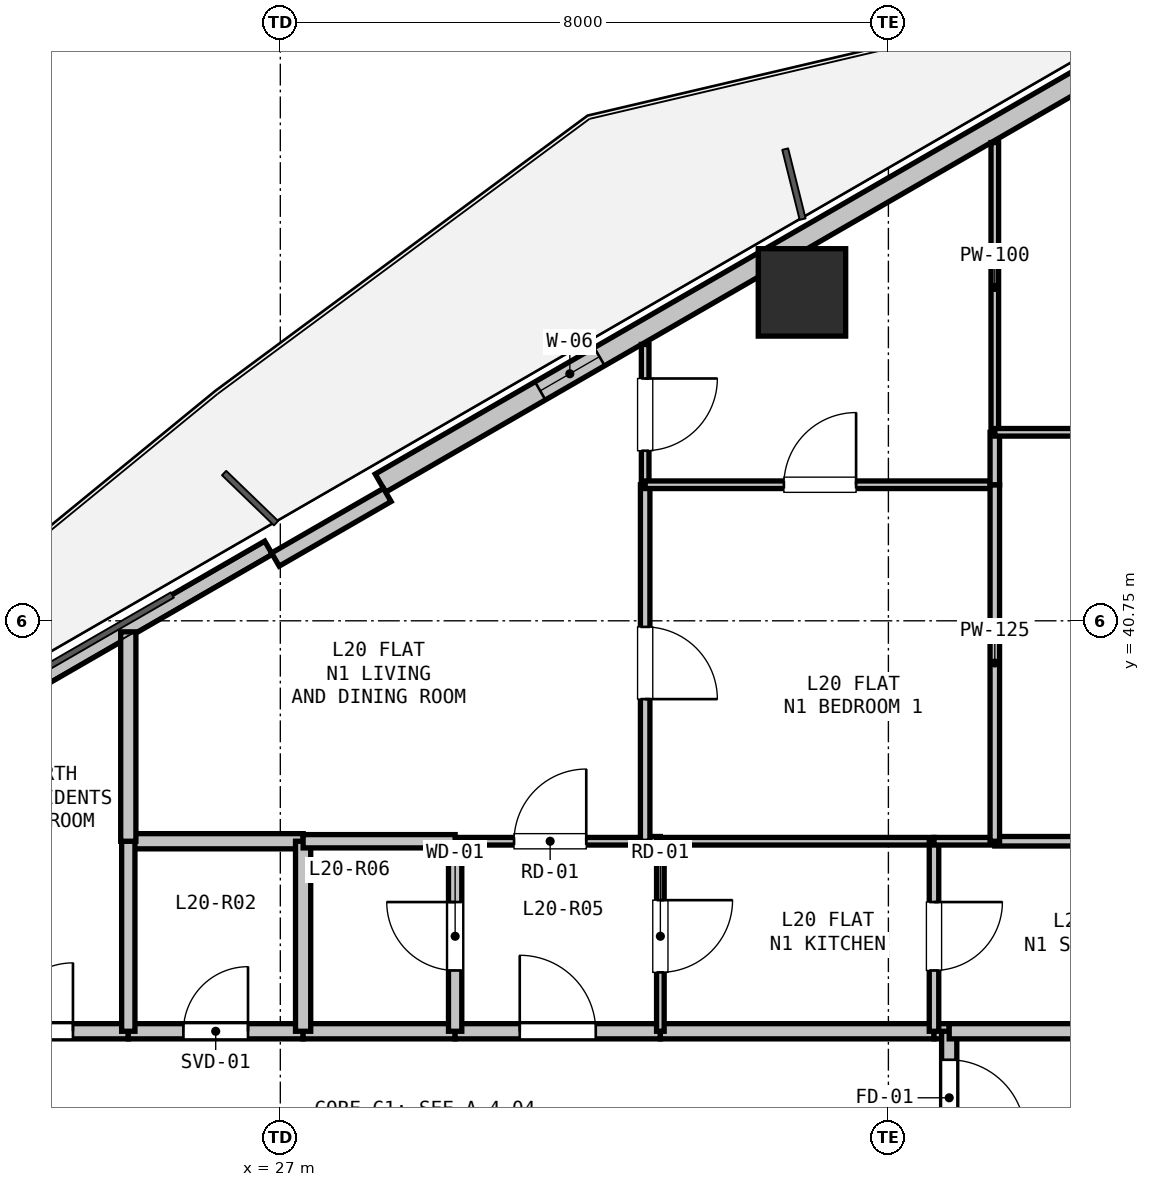
"""IFC4 building model, lengths in metres.
Left out: names, types, materials, properties, quantities, classifications, styles, units other than length and angle.
Written with IfcOpenShell. Run it as: python <this file> out.ifc"""

import sys

from ifc_helpers import new_model, si_unit, direction, frame, frame_2d, origin, origin_2d, place, context, subcontext, project, spatial, rectangle, hollow_rectangle, extrude, element, fill, save


model = new_model("IFC4")
c1 = context("Model", 3, precision=1e-05, world=origin(), true_north=direction((0.0, 1.0)))
c2 = subcontext(c1, "Body", "Model", "MODEL_VIEW")
j1 = project(units=[si_unit("LENGTHUNIT", "METRE"), si_unit("PLANEANGLEUNIT", "RADIAN")], contexts=[c1])
p1 = place(None, origin())
s1 = spatial("IfcSite", under=j1, at=p1, CompositionType="ELEMENT")
p2 = place(p1, origin())
s2 = spatial("IfcBuilding", under=s1, at=p2, CompositionType="ELEMENT")
p3 = place(p2, frame((0.0, 0.0, 76.8)))
s3 = spatial("IfcBuildingStorey", under=s2, at=p3, CompositionType="ELEMENT", Elevation=76.8)
p4 = place(p3, frame((33.863, 45.071, 0.0), z_axis=(0.0, 0.0, 1.0), x_axis=(1.0, 0.0, 0.0)))
e1 = element("IfcColumn", 1, at=p4, inside=s3, PredefinedType="COLUMN", context=c2, shape_type="SweptSolid", body=[
    extrude(hollow_rectangle(XDim=1.15, YDim=1.15, WallThickness=0.032, at=origin_2d()), origin(), (0.0, 0.0, 1.0), 3.3),
])
p5 = place(p3, frame((17.12, 36.097, 0.0), z_axis=(0.0, 0.0, 1.0), x_axis=(0.866027010039, 0.499997217876, 0.0)))
e2 = element("IfcWall", 2, at=p5, inside=s3, PredefinedType="PARAPET", context=c2, shape_type="SweptSolid", body=[
    extrude(rectangle(XDim=11.229, YDim=0.2, at=frame_2d((5.615, 0.0))), origin(), (0.0, 0.0, 1.0), 0.2),
])
p6 = place(p3, frame((28.317, 42.562, 0.0), z_axis=(0.0, 0.0, 1.0), x_axis=(0.866023023012, 0.500004123596, 0.0)))
e3 = element("IfcWall", 3, at=p6, inside=s3, PredefinedType="SOLIDWALL", context=c2, shape_type="SweptSolid", body=[
    extrude(rectangle(XDim=11.93, YDim=0.275, at=frame_2d((5.965, 0.0))), origin(), (0.0, 0.0, 1.0), 2.67),
])
p7 = place(p6, frame((2.427, 0.0, 0.9)))
e4 = element("IfcOpeningElement", 4, at=p7, cuts=e3, PredefinedType="OPENING", context=c2, shape_type="SweptSolid", body=[
    extrude(rectangle(XDim=0.9, YDim=1.4, at=frame_2d((0.45, 0.7))), frame((0.0, 0.147, 0.0), z_axis=(0.0, -1.0, 0.0), x_axis=(1.0, 0.0, 0.0)), (0.0, 0.0, 1.0), 0.295),
])
p8 = place(p3, frame((26.935, 41.556, 0.0), z_axis=(0.0, 0.0, 1.0), x_axis=(0.86605165483, 0.499954529098, 0.0)))
e5 = element("IfcWall", 5, at=p8, inside=s3, PredefinedType="PARAPET", context=c2, shape_type="SweptSolid", body=[
    extrude(rectangle(XDim=1.7, YDim=0.2, at=frame_2d((0.85, 0.0))), origin(), (0.0, 0.0, 1.0), 2.67),
])
p9 = place(p3, frame((19.8, 35.35, 0.0), z_axis=(0.0, 0.0, 1.0), x_axis=(1.0, 0.0, 0.0)))
e6 = element("IfcWall", 6, at=p9, inside=s3, PredefinedType="PARTITIONING", context=c2, shape_type="SweptSolid", body=[
    extrude(rectangle(XDim=5.2, YDim=0.2, at=frame_2d((2.6, 0.0))), origin(), (0.0, 0.0, 1.0), 3.05),
])
p10 = place(p9, frame((2.672, 0.0, 0.0)))
e7 = element("IfcOpeningElement", 7, at=p10, cuts=e6, PredefinedType="OPENING", context=c2, shape_type="SweptSolid", body=[
    extrude(rectangle(XDim=1.8, YDim=2.2, at=frame_2d((0.9, 1.1))), frame((0.0, 0.11, 0.0), z_axis=(0.0, -1.0, 0.0), x_axis=(1.0, 0.0, 0.0)), (0.0, 0.0, 1.0), 0.22),
])
p11 = place(p3, frame((25.0, 35.35, 0.0), z_axis=(0.0, 0.0, 1.0), x_axis=(1.0, 0.0, 0.0)))
e8 = element("IfcWall", 8, at=p11, inside=s3, PredefinedType="PARTITIONING", context=c2, shape_type="SweptSolid", body=[
    extrude(rectangle(XDim=2.3, YDim=0.2, at=frame_2d((1.15, 0.0))), origin(), (0.0, 0.0, 1.0), 3.05),
])
p12 = place(p11, frame((0.725, 0.0, 0.0)))
e9 = element("IfcOpeningElement", 9, at=p12, cuts=e8, PredefinedType="OPENING", context=c2, shape_type="SweptSolid", body=[
    extrude(rectangle(XDim=0.85, YDim=2.1, at=frame_2d((0.425, 1.05))), frame((0.0, 0.11, 0.0), z_axis=(0.0, -1.0, 0.0), x_axis=(1.0, 0.0, 0.0)), (0.0, 0.0, 1.0), 0.22),
])
p13 = place(p3, frame((27.3, 35.35, 0.0), z_axis=(0.0, 0.0, 1.0), x_axis=(1.0, 0.0, 0.0)))
e10 = element("IfcWall", 10, at=p13, inside=s3, PredefinedType="PARTITIONING", context=c2, shape_type="SweptSolid", body=[
    extrude(rectangle(XDim=2.0, YDim=0.2, at=frame_2d((1.0, 0.0))), origin(), (0.0, 0.0, 1.0), 3.05),
])
p14 = place(p3, frame((29.3, 35.35, 0.0), z_axis=(0.0, 0.0, 1.0), x_axis=(1.0, 0.0, 0.0)))
e11 = element("IfcWall", 11, at=p14, inside=s3, PredefinedType="PARTITIONING", context=c2, shape_type="SweptSolid", body=[
    extrude(rectangle(XDim=2.7, YDim=0.2, at=frame_2d((1.35, 0.0))), origin(), (0.0, 0.0, 1.0), 3.05),
])
p15 = place(p14, frame((0.85, 0.0, 0.0)))
e12 = element("IfcOpeningElement", 12, at=p15, cuts=e11, PredefinedType="OPENING", context=c2, shape_type="SweptSolid", body=[
    extrude(rectangle(XDim=1.0, YDim=2.15, at=frame_2d((0.5, 1.075))), frame((0.0, 0.11, 0.0), z_axis=(0.0, -1.0, 0.0), x_axis=(1.0, 0.0, 0.0)), (0.0, 0.0, 1.0), 0.22),
])
p16 = place(p3, frame((32.0, 35.35, 0.0), z_axis=(0.0, 0.0, 1.0), x_axis=(1.0, 0.0, 0.0)))
e13 = element("IfcWall", 13, at=p16, inside=s3, PredefinedType="PARTITIONING", context=c2, shape_type="SweptSolid", body=[
    extrude(rectangle(XDim=3.6, YDim=0.2, at=frame_2d((1.8, 0.0))), origin(), (0.0, 0.0, 1.0), 3.05),
])
p17 = place(p3, frame((35.6, 35.35, 0.0), z_axis=(0.0, 0.0, 1.0), x_axis=(1.0, 0.0, 0.0)))
e14 = element("IfcWall", 14, at=p17, inside=s3, PredefinedType="PARTITIONING", context=c2, shape_type="SweptSolid", body=[
    extrude(rectangle(XDim=0.2, YDim=0.2, at=frame_2d((0.1, 0.0))), origin(), (0.0, 0.0, 1.0), 3.05),
])
p18 = place(p3, frame((35.8, 35.35, 0.0), z_axis=(0.0, 0.0, 1.0), x_axis=(0.0, -1.0, 0.0)))
e15 = element("IfcWall", 15, at=p18, inside=s3, PredefinedType="PARTITIONING", context=c2, shape_type="SweptSolid", body=[
    extrude(rectangle(XDim=1.75, YDim=0.2, at=frame_2d((0.875, 0.0))), origin(), (0.0, 0.0, 1.0), 3.05),
])
p19 = place(p18, frame((0.375, 0.0, 0.0)))
e16 = element("IfcOpeningElement", 16, at=p19, cuts=e15, PredefinedType="OPENING", context=c2, shape_type="SweptSolid", body=[
    extrude(rectangle(XDim=1.0, YDim=2.15, at=frame_2d((0.5, 1.075))), frame((0.0, 0.11, 0.0), z_axis=(0.0, -1.0, 0.0), x_axis=(1.0, 0.0, 0.0)), (0.0, 0.0, 1.0), 0.22),
])
p20 = place(p3, frame((35.8, 35.35, 0.0), z_axis=(0.0, 0.0, 1.0), x_axis=(1.0, 0.0, 0.0)))
e17 = element("IfcWall", 17, at=p20, inside=s3, PredefinedType="PARTITIONING", context=c2, shape_type="SweptSolid", body=[
    extrude(rectangle(XDim=2.6, YDim=0.2, at=frame_2d((1.3, 0.0))), origin(), (0.0, 0.0, 1.0), 2.423),
])
p21 = place(p3, frame((29.3, 37.85, 0.0), z_axis=(0.0, 0.0, 1.0), x_axis=(1.0, 0.0, 0.0)))
e18 = element("IfcWall", 18, at=p21, inside=s3, PredefinedType="PARTITIONING", context=c2, shape_type="SweptSolid", body=[
    extrude(rectangle(XDim=2.5, YDim=0.1, at=frame_2d((1.25, 0.0))), origin(), (0.0, 0.0, 1.0), 3.05),
])
p22 = place(p21, frame((0.775, 0.0, 0.0)))
e19 = element("IfcOpeningElement", 19, at=p22, cuts=e18, PredefinedType="OPENING", context=c2, shape_type="SweptSolid", body=[
    extrude(rectangle(XDim=0.95, YDim=2.1, at=frame_2d((0.475, 1.05))), frame((0.0, 0.06, 0.0), z_axis=(0.0, -1.0, 0.0), x_axis=(1.0, 0.0, 0.0)), (0.0, 0.0, 1.0), 0.12),
])
p23 = place(p3, frame((31.8, 37.85, 0.0), z_axis=(0.0, 0.0, 1.0), x_axis=(1.0, 0.0, 0.0)))
e20 = element("IfcWall", 20, at=p23, inside=s3, PredefinedType="PARTITIONING", context=c2, shape_type="SweptSolid", body=[
    extrude(rectangle(XDim=0.2, YDim=0.125, at=frame_2d((0.1, 0.0))), origin(), (0.0, 0.0, 1.0), 3.05),
])
p24 = place(p3, frame((32.0, 37.85, 0.0), z_axis=(0.0, 0.0, 1.0), x_axis=(0.0, -1.0, 0.0)))
e21 = element("IfcWall", 21, at=p24, inside=s3, PredefinedType="PARTITIONING", context=c2, shape_type="SweptSolid", body=[
    extrude(rectangle(XDim=2.5, YDim=0.1, at=frame_2d((1.25, 0.0))), origin(), (0.0, 0.0, 1.0), 3.05),
])
p25 = place(p24, frame((0.775, 0.0, 0.0)))
e22 = element("IfcOpeningElement", 22, at=p25, cuts=e21, PredefinedType="OPENING", context=c2, shape_type="SweptSolid", body=[
    extrude(rectangle(XDim=0.95, YDim=2.1, at=frame_2d((0.475, 1.05))), frame((0.0, 0.06, 0.0), z_axis=(0.0, -1.0, 0.0), x_axis=(1.0, 0.0, 0.0)), (0.0, 0.0, 1.0), 0.12),
])
p26 = place(p3, frame((29.3, 35.35, 0.0), z_axis=(0.0, 0.0, 1.0), x_axis=(0.0, 1.0, 0.0)))
e23 = element("IfcWall", 23, at=p26, inside=s3, PredefinedType="PLUMBINGWALL", context=c2, shape_type="SweptSolid", body=[
    extrude(rectangle(XDim=2.5, YDim=0.175, at=frame_2d((1.25, 0.0))), origin(), (0.0, 0.0, 1.0), 3.05),
])
p27 = place(p26, frame((0.8, 0.0, 0.0)))
e24 = element("IfcOpeningElement", 24, at=p27, cuts=e23, PredefinedType="OPENING", context=c2, shape_type="SweptSolid", body=[
    extrude(rectangle(XDim=0.9, YDim=2.1, at=frame_2d((0.45, 1.05))), frame((0.0, 0.097, 0.0), z_axis=(0.0, -1.0, 0.0), x_axis=(1.0, 0.0, 0.0)), (0.0, 0.0, 1.0), 0.195),
])
p28 = place(p3, frame((25.0, 37.85, 0.0), z_axis=(0.0, 0.0, 1.0), x_axis=(1.0, 0.0, 0.0)))
e25 = element("IfcWall", 25, at=p28, inside=s3, PredefinedType="PARTITIONING", context=c2, shape_type="SweptSolid", body=[
    extrude(rectangle(XDim=2.3, YDim=0.2, at=frame_2d((1.15, 0.0))), origin(), (0.0, 0.0, 1.0), 3.05),
])
p29 = place(p3, frame((27.3, 37.85, 0.0), z_axis=(0.0, 0.0, 1.0), x_axis=(0.0, -1.0, 0.0)))
e26 = element("IfcWall", 26, at=p29, inside=s3, PredefinedType="PARTITIONING", context=c2, shape_type="SweptSolid", body=[
    extrude(rectangle(XDim=2.5, YDim=0.2, at=frame_2d((1.25, 0.0))), origin(), (0.0, 0.0, 1.0), 3.05),
])
p30 = place(p3, frame((25.0, 35.35, 0.0), z_axis=(0.0, 0.0, 1.0), x_axis=(0.0, 1.0, 0.0)))
e27 = element("IfcWall", 27, at=p30, inside=s3, PredefinedType="PLUMBINGWALL", context=c2, shape_type="SweptSolid", body=[
    extrude(rectangle(XDim=2.5, YDim=0.175, at=frame_2d((1.25, 0.0))), origin(), (0.0, 0.0, 1.0), 3.05),
])
p31 = place(p3, frame((27.3, 37.85, 0.0), z_axis=(0.0, 0.0, 1.0), x_axis=(1.0, 0.0, 0.0)))
e28 = element("IfcWall", 28, at=p31, inside=s3, PredefinedType="PLUMBINGWALL", context=c2, shape_type="SweptSolid", body=[
    extrude(rectangle(XDim=2.0, YDim=0.175, at=frame_2d((1.0, 0.0))), origin(), (0.0, 0.0, 1.0), 3.05),
])
p32 = place(p3, frame((32.0, 37.85, 0.0), z_axis=(0.0, 0.0, 1.0), x_axis=(1.0, 0.0, 0.0)))
e29 = element("IfcWall", 29, at=p32, inside=s3, PredefinedType="PARTITIONING", context=c2, shape_type="SweptSolid", body=[
    extrude(rectangle(XDim=3.6, YDim=0.1, at=frame_2d((1.8, 0.0))), origin(), (0.0, 0.0, 1.0), 3.05),
])
p33 = place(p3, frame((35.6, 37.85, 0.0), z_axis=(0.0, 0.0, 1.0), x_axis=(0.0, -1.0, 0.0)))
e30 = element("IfcWall", 30, at=p33, inside=s3, PredefinedType="PARTITIONING", context=c2, shape_type="SweptSolid", body=[
    extrude(rectangle(XDim=2.5, YDim=0.125, at=frame_2d((1.25, 0.0))), origin(), (0.0, 0.0, 1.0), 3.05),
])
p34 = place(p33, frame((0.8, 0.0, 0.0)))
e31 = element("IfcOpeningElement", 31, at=p34, cuts=e30, PredefinedType="OPENING", context=c2, shape_type="SweptSolid", body=[
    extrude(rectangle(XDim=0.9, YDim=2.1, at=frame_2d((0.45, 1.05))), frame((0.0, 0.073, 0.0), z_axis=(0.0, -1.0, 0.0), x_axis=(1.0, 0.0, 0.0)), (0.0, 0.0, 1.0), 0.145),
])
p35 = place(p3, frame((25.0, 40.605, 0.0), z_axis=(0.0, 0.0, 1.0), x_axis=(0.0, -1.0, 0.0)))
e32 = element("IfcWall", 32, at=p35, inside=s3, PredefinedType="PARTITIONING", context=c2, shape_type="SweptSolid", body=[
    extrude(rectangle(XDim=2.755, YDim=0.2, at=frame_2d((1.377, 0.0))), origin(), (0.0, 0.0, 1.0), 2.365),
])
p36 = place(p3, frame((35.6, 37.85, 0.0), z_axis=(0.0, 0.0, 1.0), x_axis=(1.0, 0.0, 0.0)))
e33 = element("IfcWall", 33, at=p36, inside=s3, PredefinedType="PARTITIONING", context=c2, shape_type="SweptSolid", body=[
    extrude(rectangle(XDim=0.8, YDim=0.1, at=frame_2d((0.4, 0.0))), origin(), (0.0, 0.0, 1.0), 3.05),
])
p37 = place(p3, frame((36.4, 37.85, 0.0), z_axis=(0.0, 0.0, 1.0), x_axis=(1.0, 0.0, 0.0)))
e34 = element("IfcWall", 34, at=p37, inside=s3, PredefinedType="PARTITIONING", context=c2, shape_type="SweptSolid", body=[
    extrude(rectangle(XDim=6.473, YDim=0.125, at=frame_2d((3.237, 0.0))), origin(), (0.0, 0.0, 1.0), 2.365),
])
p38 = place(p37, frame((2.762, 0.0, 0.0)))
e35 = element("IfcOpeningElement", 35, at=p38, cuts=e34, PredefinedType="OPENING", context=c2, shape_type="SweptSolid", body=[
    extrude(rectangle(XDim=0.95, YDim=2.1, at=frame_2d((0.475, 1.05))), frame((0.0, 0.073, 0.0), z_axis=(0.0, -1.0, 0.0), x_axis=(1.0, 0.0, 0.0)), (0.0, 0.0, 1.0), 0.145),
])
p39 = place(p3, frame((31.8, 44.386, 0.0), z_axis=(0.0, 0.0, 1.0), x_axis=(0.0, -1.0, 0.0)))
e36 = element("IfcWall", 36, at=p39, inside=s3, PredefinedType="PARTITIONING", context=c2, shape_type="SweptSolid", body=[
    extrude(rectangle(XDim=1.846, YDim=0.1, at=frame_2d((0.923, 0.0))), origin(), (0.0, 0.0, 1.0), 2.365),
])
p40 = place(p39, frame((0.448, 0.0, 0.0)))
e37 = element("IfcOpeningElement", 37, at=p40, cuts=e36, PredefinedType="OPENING", context=c2, shape_type="SweptSolid", body=[
    extrude(rectangle(XDim=0.95, YDim=2.1, at=frame_2d((0.475, 1.05))), frame((0.0, 0.06, 0.0), z_axis=(0.0, -1.0, 0.0), x_axis=(1.0, 0.0, 0.0)), (0.0, 0.0, 1.0), 0.12),
])
p41 = place(p3, frame((31.8, 42.54, 0.0), z_axis=(0.0, 0.0, 1.0), x_axis=(0.0, -1.0, 0.0)))
e38 = element("IfcWall", 38, at=p41, inside=s3, PredefinedType="PARTITIONING", context=c2, shape_type="SweptSolid", body=[
    extrude(rectangle(XDim=4.69, YDim=0.125, at=frame_2d((2.345, 0.0))), origin(), (0.0, 0.0, 1.0), 3.05),
])
p42 = place(p41, frame((1.87, 0.0, 0.0)))
e39 = element("IfcOpeningElement", 39, at=p42, cuts=e38, PredefinedType="OPENING", context=c2, shape_type="SweptSolid", body=[
    extrude(rectangle(XDim=0.95, YDim=2.1, at=frame_2d((0.475, 1.05))), frame((0.0, 0.073, 0.0), z_axis=(0.0, -1.0, 0.0), x_axis=(1.0, 0.0, 0.0)), (0.0, 0.0, 1.0), 0.145),
])
p43 = place(p3, frame((31.8, 42.54, 0.0), z_axis=(0.0, 0.0, 1.0), x_axis=(1.0, 0.0, 0.0)))
e40 = element("IfcWall", 40, at=p43, inside=s3, PredefinedType="PARTITIONING", context=c2, shape_type="SweptSolid", body=[
    extrude(rectangle(XDim=4.6, YDim=0.1, at=frame_2d((2.3, 0.0))), origin(), (0.0, 0.0, 1.0), 3.05),
])
p44 = place(p43, frame((1.825, 0.0, 0.0)))
e41 = element("IfcOpeningElement", 41, at=p44, cuts=e40, PredefinedType="OPENING", context=c2, shape_type="SweptSolid", body=[
    extrude(rectangle(XDim=0.95, YDim=2.1, at=frame_2d((0.475, 1.05))), frame((0.0, 0.06, 0.0), z_axis=(0.0, -1.0, 0.0), x_axis=(1.0, 0.0, 0.0)), (0.0, 0.0, 1.0), 0.12),
])
p45 = place(p3, frame((36.4, 42.54, 0.0), z_axis=(0.0, 0.0, 1.0), x_axis=(0.0, -1.0, 0.0)))
e42 = element("IfcWall", 42, at=p45, inside=s3, PredefinedType="PARTITIONING", context=c2, shape_type="SweptSolid", body=[
    extrude(rectangle(XDim=4.69, YDim=0.125, at=frame_2d((2.345, 0.0))), origin(), (0.0, 0.0, 1.0), 3.05),
])
p46 = place(p3, frame((36.4, 47.042, 0.0), z_axis=(0.0, 0.0, 1.0), x_axis=(0.0, -1.0, 0.0)))
e43 = element("IfcWall", 43, at=p46, inside=s3, PredefinedType="PARTITIONING", context=c2, shape_type="SweptSolid", body=[
    extrude(rectangle(XDim=3.812, YDim=0.1, at=frame_2d((1.906, 0.0))), origin(), (0.0, 0.0, 1.0), 2.66),
])
p47 = place(p3, frame((36.4, 43.23, 0.0), z_axis=(0.0, 0.0, 1.0), x_axis=(0.0, -1.0, 0.0)))
e44 = element("IfcWall", 44, at=p47, inside=s3, PredefinedType="PARTITIONING", context=c2, shape_type="SweptSolid", body=[
    extrude(rectangle(XDim=0.69, YDim=0.125, at=frame_2d((0.345, 0.0))), origin(), (0.0, 0.0, 1.0), 3.05),
])
p48 = place(p3, frame((36.4, 43.23, 0.0), z_axis=(0.0, 0.0, 1.0), x_axis=(1.0, 0.0, 0.0)))
e45 = element("IfcWall", 45, at=p48, inside=s3, PredefinedType="PARTITIONING", context=c2, shape_type="SweptSolid", body=[
    extrude(rectangle(XDim=6.473, YDim=0.1, at=frame_2d((3.237, 0.0))), origin(), (0.0, 0.0, 1.0), 2.423),
])
p49 = place(p48, frame((2.762, 0.0, 0.0)))
e46 = element("IfcOpeningElement", 46, at=p49, cuts=e45, PredefinedType="OPENING", context=c2, shape_type="SweptSolid", body=[
    extrude(rectangle(XDim=0.95, YDim=2.1, at=frame_2d((0.475, 1.05))), frame((0.0, 0.06, 0.0), z_axis=(0.0, -1.0, 0.0), x_axis=(1.0, 0.0, 0.0)), (0.0, 0.0, 1.0), 0.12),
])
p50 = place(p7, origin())
e47 = element("IfcWindow", 47, at=p50, inside=s3, PartitioningType="SINGLE_PANEL", PredefinedType="WINDOW", context=c2, shape_type="SweptSolid", body=[
    extrude(rectangle(XDim=0.9, YDim=1.4, at=frame_2d((0.45, 0.7))), frame((0.0, 0.03, 0.0), z_axis=(0.0, -1.0, 0.0), x_axis=(1.0, 0.0, 0.0)), (0.0, 0.0, 1.0), 0.06),
])
fill(e4, e47)
p51 = place(p19, origin())
e48 = element("IfcDoor", 48, at=p51, inside=s3, OperationType="SINGLE_SWING_RIGHT", PredefinedType="DOOR", context=c2, shape_type="SweptSolid", body=[
    extrude(rectangle(XDim=1.0, YDim=2.15, at=frame_2d((0.5, 1.075))), frame((0.0, 0.025, 0.0), z_axis=(0.0, -1.0, 0.0), x_axis=(1.0, 0.0, 0.0)), (0.0, 0.0, 1.0), 0.05),
])
fill(e16, e48)
p52 = place(p15, origin())
e49 = element("IfcDoor", 49, at=p52, inside=s3, OperationType="SINGLE_SWING_LEFT", PredefinedType="DOOR", context=c2, shape_type="SweptSolid", body=[
    extrude(rectangle(XDim=1.0, YDim=2.15, at=frame_2d((0.5, 1.075))), frame((0.0, 0.025, 0.0), z_axis=(0.0, -1.0, 0.0), x_axis=(1.0, 0.0, 0.0)), (0.0, 0.0, 1.0), 0.05),
])
fill(e12, e49)
p53 = place(p12, origin())
e50 = element("IfcDoor", 50, at=p53, inside=s3, OperationType="SINGLE_SWING_RIGHT", PredefinedType="DOOR", context=c2, shape_type="SweptSolid", body=[
    extrude(rectangle(XDim=0.85, YDim=2.1, at=frame_2d((0.425, 1.05))), frame((0.0, 0.025, 0.0), z_axis=(0.0, -1.0, 0.0), x_axis=(1.0, 0.0, 0.0)), (0.0, 0.0, 1.0), 0.05),
])
fill(e9, e50)
p54 = place(p10, origin())
e51 = element("IfcDoor", 51, at=p54, inside=s3, OperationType="DOUBLE_DOOR_SINGLE_SWING", PredefinedType="DOOR", context=c2, shape_type="SweptSolid", body=[
    extrude(rectangle(XDim=1.8, YDim=2.2, at=frame_2d((0.9, 1.1))), frame((0.0, 0.025, 0.0), z_axis=(0.0, -1.0, 0.0), x_axis=(1.0, 0.0, 0.0)), (0.0, 0.0, 1.0), 0.05),
])
fill(e7, e51)
p55 = place(p27, origin())
e52 = element("IfcDoor", 52, at=p55, inside=s3, OperationType="SINGLE_SWING_RIGHT", PredefinedType="DOOR", context=c2, shape_type="SweptSolid", body=[
    extrude(rectangle(XDim=0.9, YDim=2.1, at=frame_2d((0.45, 1.05))), frame((0.0, 0.025, 0.0), z_axis=(0.0, -1.0, 0.0), x_axis=(1.0, 0.0, 0.0)), (0.0, 0.0, 1.0), 0.05),
])
fill(e24, e52)
p56 = place(p25, origin())
e53 = element("IfcDoor", 53, at=p56, inside=s3, OperationType="SINGLE_SWING_LEFT", PredefinedType="DOOR", context=c2, shape_type="SweptSolid", body=[
    extrude(rectangle(XDim=0.95, YDim=2.1, at=frame_2d((0.475, 1.05))), frame((0.0, 0.025, 0.0), z_axis=(0.0, -1.0, 0.0), x_axis=(1.0, 0.0, 0.0)), (0.0, 0.0, 1.0), 0.05),
])
fill(e22, e53)
p57 = place(p22, origin())
e54 = element("IfcDoor", 54, at=p57, inside=s3, OperationType="SINGLE_SWING_RIGHT", PredefinedType="DOOR", context=c2, shape_type="SweptSolid", body=[
    extrude(rectangle(XDim=0.95, YDim=2.1, at=frame_2d((0.475, 1.05))), frame((0.0, 0.025, 0.0), z_axis=(0.0, -1.0, 0.0), x_axis=(1.0, 0.0, 0.0)), (0.0, 0.0, 1.0), 0.05),
])
fill(e19, e54)
p58 = place(p42, origin())
e55 = element("IfcDoor", 55, at=p58, inside=s3, OperationType="SINGLE_SWING_RIGHT", PredefinedType="DOOR", context=c2, shape_type="SweptSolid", body=[
    extrude(rectangle(XDim=0.95, YDim=2.1, at=frame_2d((0.475, 1.05))), frame((0.0, 0.025, 0.0), z_axis=(0.0, -1.0, 0.0), x_axis=(1.0, 0.0, 0.0)), (0.0, 0.0, 1.0), 0.05),
])
fill(e39, e55)
p59 = place(p40, origin())
e56 = element("IfcDoor", 56, at=p59, inside=s3, OperationType="SINGLE_SWING_LEFT", PredefinedType="DOOR", context=c2, shape_type="SweptSolid", body=[
    extrude(rectangle(XDim=0.95, YDim=2.1, at=frame_2d((0.475, 1.05))), frame((0.0, 0.025, 0.0), z_axis=(0.0, -1.0, 0.0), x_axis=(1.0, 0.0, 0.0)), (0.0, 0.0, 1.0), 0.05),
])
fill(e37, e56)
p60 = place(p44, origin())
e57 = element("IfcDoor", 57, at=p60, inside=s3, OperationType="SINGLE_SWING_RIGHT", PredefinedType="DOOR", context=c2, shape_type="SweptSolid", body=[
    extrude(rectangle(XDim=0.95, YDim=2.1, at=frame_2d((0.475, 1.05))), frame((0.0, 0.025, 0.0), z_axis=(0.0, -1.0, 0.0), x_axis=(1.0, 0.0, 0.0)), (0.0, 0.0, 1.0), 0.05),
])
fill(e41, e57)
p61 = place(p34, origin())
e58 = element("IfcDoor", 58, at=p61, inside=s3, OperationType="SINGLE_SWING_LEFT", PredefinedType="DOOR", context=c2, shape_type="SweptSolid", body=[
    extrude(rectangle(XDim=0.9, YDim=2.1, at=frame_2d((0.45, 1.05))), frame((0.0, 0.025, 0.0), z_axis=(0.0, -1.0, 0.0), x_axis=(1.0, 0.0, 0.0)), (0.0, 0.0, 1.0), 0.05),
])
fill(e31, e58)
save(model, sys.argv[1])
